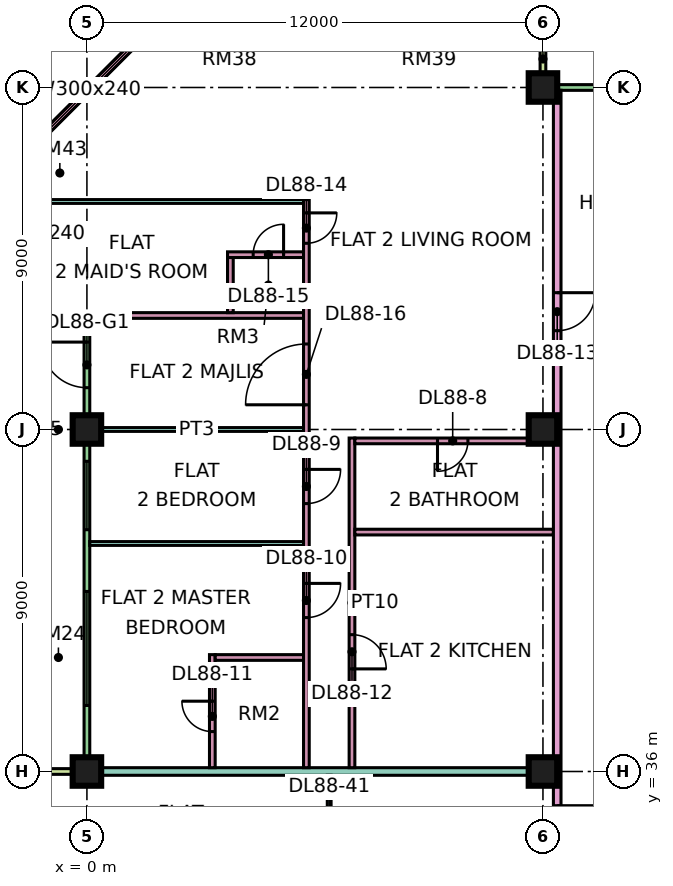
"""IFC4 building model, lengths in metres.
Left out: names, types, materials, properties, quantities, classifications, styles, units other than length and angle.
Written with IfcOpenShell. Run it as: python <this file> out.ifc"""

import sys

from ifc_helpers import new_model, si_unit, direction, frame, frame_2d, origin, origin_2d, place, context, subcontext, project, spatial, rectangle, extrude, element, fill, save


model = new_model("IFC4")
c1 = context("Model", 3, precision=1e-05, world=origin(), true_north=direction((0.0, 1.0)))
c2 = subcontext(c1, "Body", "Model", "MODEL_VIEW")
j1 = project(units=[si_unit("LENGTHUNIT", "METRE"), si_unit("PLANEANGLEUNIT", "RADIAN")], contexts=[c1])
p1 = place(None, origin())
s1 = spatial("IfcSite", under=j1, at=p1, CompositionType="ELEMENT")
p2 = place(p1, origin())
s2 = spatial("IfcBuilding", under=s1, at=p2, CompositionType="ELEMENT")
p3 = place(p2, frame((0.0, 0.0, 376.4)))
s3 = spatial("IfcBuildingStorey", under=s2, at=p3, CompositionType="ELEMENT", Elevation=376.4)
p4 = place(p3, frame((0.0, 36.0, 0.0), z_axis=(0.0, 0.0, 1.0), x_axis=(1.0, 0.0, 0.0)))
e1 = element("IfcColumn", 1, at=p4, inside=s3, PredefinedType="COLUMN", context=c2, shape_type="SweptSolid", body=[
    extrude(rectangle(XDim=0.75, YDim=0.75, at=origin_2d()), origin(), (0.0, 0.0, 1.0), 3.75),
])
for number, where, z_axis, x_axis in (
    (2, (0.0, 45.0, 0.0), (0.0, 0.0, 1.0), (1.0, 0.0, 0.0)),
    (3, (12.0, 36.0, 0.0), (0.0, 0.0, 1.0), (1.0, 0.0, 0.0)),
    (4, (12.0, 45.0, 0.0), (0.0, 0.0, 1.0), (1.0, 0.0, 0.0)),
    (5, (12.0, 54.0, 0.0), (0.0, 0.0, 1.0), (1.0, 0.0, 0.0)),
):
    element("IfcColumn", number, at=place(p3, frame(where, z_axis=z_axis, x_axis=x_axis)), inside=s3, PredefinedType="COLUMN", context=c2, shape_type="SweptSolid", body=[
        extrude(rectangle(XDim=0.75, YDim=0.75, at=origin_2d()), origin(), (0.0, 0.0, 1.0), 3.75),
    ])
p5 = place(p3, frame((22.425, 54.0, 0.0), z_axis=(0.0, 0.0, 1.0), x_axis=(-1.0, 0.0, 0.0)))
e6 = element("IfcWall", 6, at=p5, inside=s3, PredefinedType="SOLIDWALL", context=c2, shape_type="SweptSolid", body=[
    extrude(rectangle(XDim=10.35, YDim=0.15, at=frame_2d((5.175, 0.0))), origin(), (0.0, 0.0, 1.0), 3.35),
])
p6 = place(p5, frame((1.012, 0.0, 0.45)))
e7 = element("IfcOpeningElement", 7, at=p6, cuts=e6, PredefinedType="OPENING", context=c2, shape_type="SweptSolid", body=[
    extrude(rectangle(XDim=4.8, YDim=2.4, at=frame_2d((2.4, 1.2))), frame((0.0, 0.085, 0.0), z_axis=(0.0, -1.0, 0.0), x_axis=(1.0, 0.0, 0.0)), (0.0, 0.0, 1.0), 0.17),
])
p7 = place(p3, frame((12.0, 55.5, 0.0), z_axis=(0.0, 0.0, 1.0), x_axis=(0.0, -1.0, 0.0)))
e8 = element("IfcWall", 8, at=p7, inside=s3, PredefinedType="SOLIDWALL", context=c2, shape_type="SweptSolid", body=[
    extrude(rectangle(XDim=1.5, YDim=0.15, at=frame_2d((0.75, 0.0))), origin(), (0.0, 0.0, 1.0), 3.35),
])
p8 = place(p3, frame((1.553, 55.447, 0.0), z_axis=(0.0, 0.0, 1.0), x_axis=(-0.707106781187, -0.707106781187, 0.0)))
e9 = element("IfcWall", 9, at=p8, inside=s3, PredefinedType="SOLIDWALL", context=c2, shape_type="SweptSolid", body=[
    extrude(rectangle(XDim=4.243, YDim=0.15, at=frame_2d((2.121, 0.0))), origin(), (0.0, 0.0, 1.0), 3.35),
])
p9 = place(p8, frame((0.621, 0.0, 0.45)))
e10 = element("IfcOpeningElement", 10, at=p9, cuts=e9, PredefinedType="OPENING", context=c2, shape_type="SweptSolid", body=[
    extrude(rectangle(XDim=3.0, YDim=2.4, at=frame_2d((1.5, 1.2))), frame((0.0, 0.085, 0.0), z_axis=(0.0, -1.0, 0.0), x_axis=(1.0, 0.0, 0.0)), (0.0, 0.0, 1.0), 0.17),
])
p10 = place(p3, frame((0.0, 47.925, 0.0), z_axis=(0.0, 0.0, 1.0), x_axis=(0.0, -1.0, 0.0)))
e11 = element("IfcWall", 11, at=p10, inside=s3, PredefinedType="SOLIDWALL", context=c2, shape_type="SweptSolid", body=[
    extrude(rectangle(XDim=11.85, YDim=0.15, at=frame_2d((5.925, 0.0))), origin(), (0.0, 0.0, 1.0), 3.35),
])
p11 = place(p10, frame((0.625, 0.0, 0.0)))
e12 = element("IfcOpeningElement", 12, at=p11, cuts=e11, PredefinedType="OPENING", context=c2, shape_type="SweptSolid", body=[
    extrude(rectangle(XDim=1.2, YDim=2.4, at=frame_2d((0.6, 1.2))), frame((0.0, 0.085, 0.0), z_axis=(0.0, -1.0, 0.0), x_axis=(1.0, 0.0, 0.0)), (0.0, 0.0, 1.0), 0.17),
])
p12 = place(p10, frame((3.762, 0.0, 0.45)))
e13 = element("IfcOpeningElement", 13, at=p12, cuts=e11, PredefinedType="OPENING", context=c2, shape_type="SweptSolid", body=[
    extrude(rectangle(XDim=1.8, YDim=2.4, at=frame_2d((0.9, 1.2))), frame((0.0, 0.085, 0.0), z_axis=(0.0, -1.0, 0.0), x_axis=(1.0, 0.0, 0.0)), (0.0, 0.0, 1.0), 0.17),
])
p13 = place(p10, frame((7.188, 0.0, 0.45)))
e14 = element("IfcOpeningElement", 14, at=p13, cuts=e11, PredefinedType="OPENING", context=c2, shape_type="SweptSolid", body=[
    extrude(rectangle(XDim=3.0, YDim=2.4, at=frame_2d((1.5, 1.2))), frame((0.0, 0.085, 0.0), z_axis=(0.0, -1.0, 0.0), x_axis=(1.0, 0.0, 0.0)), (0.0, 0.0, 1.0), 0.17),
])
for number, where, z_axis, x_axis in (
    (15, (-1.5, 48.0, 0.0), (0.0, 0.0, 1.0), (1.0, 0.0, 0.0)),
    (16, (-1.5, 36.0, 0.0), (0.0, 0.0, 1.0), (1.0, 0.0, 0.0)),
):
    element("IfcWall", number, at=place(p3, frame(where, z_axis=z_axis, x_axis=x_axis)), inside=s3, PredefinedType="SOLIDWALL", context=c2, shape_type="SweptSolid", body=[
        extrude(rectangle(XDim=1.5, YDim=0.15, at=frame_2d((0.75, 0.0))), origin(), (0.0, 0.0, 1.0), 3.35),
    ])
e17 = element("IfcWall", 17, at=p4, inside=s3, PredefinedType="PARTITIONING", context=c2, shape_type="SweptSolid", body=[
    extrude(rectangle(XDim=12.275, YDim=0.2, at=frame_2d((6.137, 0.0))), origin(), (0.0, 0.0, 1.0), 3.35),
])
p14 = place(p3, frame((0.0, 48.0, 0.0), z_axis=(0.0, 0.0, 1.0), x_axis=(1.0, 0.0, 0.0)))
e18 = element("IfcWall", 18, at=p14, inside=s3, PredefinedType="PARTITIONING", context=c2, shape_type="SweptSolid", body=[
    extrude(rectangle(XDim=5.7, YDim=0.15, at=frame_2d((2.85, 0.0))), origin(), (0.0, 0.0, 1.0), 3.35),
])
p15 = place(p3, frame((-1.35, 51.0, 0.0), z_axis=(0.0, 0.0, 1.0), x_axis=(1.0, 0.0, 0.0)))
e19 = element("IfcWall", 19, at=p15, inside=s3, PredefinedType="PARTITIONING", context=c2, shape_type="SweptSolid", body=[
    extrude(rectangle(XDim=7.05, YDim=0.1, at=frame_2d((3.525, 0.0))), origin(), (0.0, 0.0, 1.0), 3.35),
])
for number, where, z_axis, x_axis in (
    (20, (0.074, 42.0, 0.0), (0.0, 0.0, 1.0), (1.0, 0.0, 0.0)),
    (21, (0.074, 45.0, 0.0), (0.0, 0.0, 1.0), (1.0, 0.0, 0.0)),
):
    element("IfcWall", number, at=place(p3, frame(where, z_axis=z_axis, x_axis=x_axis)), inside=s3, PredefinedType="PARTITIONING", context=c2, shape_type="SweptSolid", body=[
        extrude(rectangle(XDim=5.626, YDim=0.1, at=frame_2d((2.813, 0.0))), origin(), (0.0, 0.0, 1.0), 3.35),
    ])
p16 = place(p3, frame((3.3, 36.1, 0.0), z_axis=(0.0, 0.0, 1.0), x_axis=(0.0, 1.0, 0.0)))
e22 = element("IfcWall", 22, at=p16, inside=s3, PredefinedType="PARTITIONING", context=c2, shape_type="SweptSolid", body=[
    extrude(rectangle(XDim=2.975, YDim=0.15, at=frame_2d((1.487, 0.0))), origin(), (0.0, 0.0, 1.0), 3.35),
])
p17 = place(p16, frame((0.95, 0.0, 0.0)))
e23 = element("IfcOpeningElement", 23, at=p17, cuts=e22, PredefinedType="OPENING", context=c2, shape_type="SweptSolid", body=[
    extrude(rectangle(XDim=0.8, YDim=2.1, at=frame_2d((0.4, 1.05))), frame((0.0, 0.085, 0.0), z_axis=(0.0, -1.0, 0.0), x_axis=(1.0, 0.0, 0.0)), (0.0, 0.0, 1.0), 0.17),
])
p18 = place(p3, frame((3.375, 39.0, 0.0), z_axis=(0.0, 0.0, 1.0), x_axis=(1.0, 0.0, 0.0)))
e24 = element("IfcWall", 24, at=p18, inside=s3, PredefinedType="PARTITIONING", context=c2, shape_type="SweptSolid", body=[
    extrude(rectangle(XDim=2.325, YDim=0.15, at=frame_2d((1.163, 0.0))), origin(), (0.0, 0.0, 1.0), 3.35),
])
p19 = place(p3, frame((3.7, 49.6, 0.0), z_axis=(0.0, 0.0, 1.0), x_axis=(1.0, 0.0, 0.0)))
e25 = element("IfcWall", 25, at=p19, inside=s3, PredefinedType="PARTITIONING", context=c2, shape_type="SweptSolid", body=[
    extrude(rectangle(XDim=2.0, YDim=0.15, at=frame_2d((1.0, 0.0))), origin(), (0.0, 0.0, 1.0), 3.35),
])
p20 = place(p19, frame((0.675, 0.0, 0.0)))
e26 = element("IfcOpeningElement", 26, at=p20, cuts=e25, PredefinedType="OPENING", context=c2, shape_type="SweptSolid", body=[
    extrude(rectangle(XDim=0.8, YDim=2.1, at=frame_2d((0.4, 1.05))), frame((0.0, 0.085, 0.0), z_axis=(0.0, -1.0, 0.0), x_axis=(1.0, 0.0, 0.0)), (0.0, 0.0, 1.0), 0.17),
])
p21 = place(p3, frame((3.775, 48.075, 0.0), z_axis=(0.0, 0.0, 1.0), x_axis=(0.0, 1.0, 0.0)))
e27 = element("IfcWall", 27, at=p21, inside=s3, PredefinedType="PARTITIONING", context=c2, shape_type="SweptSolid", body=[
    extrude(rectangle(XDim=1.45, YDim=0.15, at=frame_2d((0.725, 0.0))), origin(), (0.0, 0.0, 1.0), 3.35),
])
p22 = place(p3, frame((5.775, 36.1, 0.0), z_axis=(0.0, 0.0, 1.0), x_axis=(0.0, 1.0, 0.0)))
e28 = element("IfcWall", 28, at=p22, inside=s3, PredefinedType="PARTITIONING", context=c2, shape_type="SweptSolid", body=[
    extrude(rectangle(XDim=14.95, YDim=0.15, at=frame_2d((7.475, 0.0))), origin(), (0.0, 0.0, 1.0), 3.35),
])
p23 = place(p22, frame((6.95, 0.0, 0.0)))
e29 = element("IfcOpeningElement", 29, at=p23, cuts=e28, PredefinedType="OPENING", context=c2, shape_type="SweptSolid", body=[
    extrude(rectangle(XDim=0.9, YDim=2.1, at=frame_2d((0.45, 1.05))), frame((0.0, 0.085, 0.0), z_axis=(0.0, -1.0, 0.0), x_axis=(1.0, 0.0, 0.0)), (0.0, 0.0, 1.0), 0.17),
])
p24 = place(p22, frame((3.95, 0.0, 0.0)))
e30 = element("IfcOpeningElement", 30, at=p24, cuts=e28, PredefinedType="OPENING", context=c2, shape_type="SweptSolid", body=[
    extrude(rectangle(XDim=0.9, YDim=2.1, at=frame_2d((0.45, 1.05))), frame((0.0, 0.085, 0.0), z_axis=(0.0, -1.0, 0.0), x_axis=(1.0, 0.0, 0.0)), (0.0, 0.0, 1.0), 0.17),
])
p25 = place(p22, frame((13.8, 0.0, 0.0)))
e31 = element("IfcOpeningElement", 31, at=p25, cuts=e28, PredefinedType="OPENING", context=c2, shape_type="SweptSolid", body=[
    extrude(rectangle(XDim=0.8, YDim=2.1, at=frame_2d((0.4, 1.05))), frame((0.0, 0.085, 0.0), z_axis=(0.0, -1.0, 0.0), x_axis=(1.0, 0.0, 0.0)), (0.0, 0.0, 1.0), 0.17),
])
p26 = place(p22, frame((9.55, 0.0, 0.0)))
e32 = element("IfcOpeningElement", 32, at=p26, cuts=e28, PredefinedType="OPENING", context=c2, shape_type="SweptSolid", body=[
    extrude(rectangle(XDim=1.6, YDim=2.1, at=frame_2d((0.8, 1.05))), frame((0.0, 0.085, 0.0), z_axis=(0.0, -1.0, 0.0), x_axis=(1.0, 0.0, 0.0)), (0.0, 0.0, 1.0), 0.17),
])
p27 = place(p3, frame((6.375, 33.05, 0.0), z_axis=(0.0, 0.0, 1.0), x_axis=(0.0, 1.0, 0.0)))
e33 = element("IfcWall", 33, at=p27, inside=s3, PredefinedType="PARTITIONING", context=c2, shape_type="SweptSolid", body=[
    extrude(rectangle(XDim=2.85, YDim=0.1, at=frame_2d((1.425, 0.0))), origin(), (0.0, 0.0, 1.0), 3.35),
])
p28 = place(p27, frame((1.0, 0.0, 0.0)))
e34 = element("IfcOpeningElement", 34, at=p28, cuts=e33, PredefinedType="OPENING", context=c2, shape_type="SweptSolid", body=[
    extrude(rectangle(XDim=0.9, YDim=2.1, at=frame_2d((0.45, 1.05))), frame((0.0, 0.06, 0.0), z_axis=(0.0, -1.0, 0.0), x_axis=(1.0, 0.0, 0.0)), (0.0, 0.0, 1.0), 0.12),
])
p29 = place(p3, frame((6.975, 36.1, 0.0), z_axis=(0.0, 0.0, 1.0), x_axis=(0.0, 1.0, 0.0)))
e35 = element("IfcWall", 35, at=p29, inside=s3, PredefinedType="PARTITIONING", context=c2, shape_type="SweptSolid", body=[
    extrude(rectangle(XDim=8.675, YDim=0.15, at=frame_2d((4.337, 0.0))), origin(), (0.0, 0.0, 1.0), 3.35),
])
p30 = place(p29, frame((2.6, 0.0, 0.0)))
e36 = element("IfcOpeningElement", 36, at=p30, cuts=e35, PredefinedType="OPENING", context=c2, shape_type="SweptSolid", body=[
    extrude(rectangle(XDim=0.9, YDim=2.1, at=frame_2d((0.45, 1.05))), frame((0.0, 0.085, 0.0), z_axis=(0.0, -1.0, 0.0), x_axis=(1.0, 0.0, 0.0)), (0.0, 0.0, 1.0), 0.17),
])
p31 = place(p3, frame((7.05, 42.3, 0.0), z_axis=(0.0, 0.0, 1.0), x_axis=(1.0, 0.0, 0.0)))
e37 = element("IfcWall", 37, at=p31, inside=s3, PredefinedType="PARTITIONING", context=c2, shape_type="SweptSolid", body=[
    extrude(rectangle(XDim=5.225, YDim=0.15, at=frame_2d((2.612, 0.0))), origin(), (0.0, 0.0, 1.0), 3.35),
])
p32 = place(p3, frame((7.05, 44.7, 0.0), z_axis=(0.0, 0.0, 1.0), x_axis=(1.0, 0.0, 0.0)))
e38 = element("IfcWall", 38, at=p32, inside=s3, PredefinedType="PARTITIONING", context=c2, shape_type="SweptSolid", body=[
    extrude(rectangle(XDim=5.225, YDim=0.15, at=frame_2d((2.612, 0.0))), origin(), (0.0, 0.0, 1.0), 3.35),
])
p33 = place(p32, frame((2.175, 0.0, 0.0)))
e39 = element("IfcOpeningElement", 39, at=p33, cuts=e38, PredefinedType="OPENING", context=c2, shape_type="SweptSolid", body=[
    extrude(rectangle(XDim=0.8, YDim=2.1, at=frame_2d((0.4, 1.05))), frame((0.0, 0.085, 0.0), z_axis=(0.0, -1.0, 0.0), x_axis=(1.0, 0.0, 0.0)), (0.0, 0.0, 1.0), 0.17),
])
p34 = place(p3, frame((12.375, 20.0, 0.0), z_axis=(0.0, 0.0, 1.0), x_axis=(0.0, 1.0, 0.0)))
e40 = element("IfcWall", 40, at=p34, inside=s3, PredefinedType="PARTITIONING", context=c2, shape_type="SweptSolid", body=[
    extrude(rectangle(XDim=33.926, YDim=0.2, at=frame_2d((16.963, 0.0))), origin(), (0.0, 0.0, 1.0), 3.35),
])
p35 = place(p34, frame((27.6, 0.0, 0.0)))
e41 = element("IfcOpeningElement", 41, at=p35, cuts=e40, PredefinedType="OPENING", context=c2, shape_type="SweptSolid", body=[
    extrude(rectangle(XDim=1.0, YDim=2.1, at=frame_2d((0.5, 1.05))), frame((0.0, 0.11, 0.0), z_axis=(0.0, -1.0, 0.0), x_axis=(1.0, 0.0, 0.0)), (0.0, 0.0, 1.0), 0.22),
])
p36 = place(p34, frame((0.6, 0.0, 0.0)))
e42 = element("IfcOpeningElement", 42, at=p36, cuts=e40, PredefinedType="OPENING", context=c2, shape_type="SweptSolid", body=[
    extrude(rectangle(XDim=1.2, YDim=2.1, at=frame_2d((0.6, 1.05))), frame((0.0, 0.11, 0.0), z_axis=(0.0, -1.0, 0.0), x_axis=(1.0, 0.0, 0.0)), (0.0, 0.0, 1.0), 0.22),
])
p37 = place(p34, frame((14.1, 0.0, 0.0)))
e43 = element("IfcOpeningElement", 43, at=p37, cuts=e40, PredefinedType="OPENING", context=c2, shape_type="SweptSolid", body=[
    extrude(rectangle(XDim=1.0, YDim=2.1, at=frame_2d((0.5, 1.05))), frame((0.0, 0.11, 0.0), z_axis=(0.0, -1.0, 0.0), x_axis=(1.0, 0.0, 0.0)), (0.0, 0.0, 1.0), 0.22),
])
p38 = place(p9, origin())
e44 = element("IfcWindow", 44, at=p38, inside=s3, PartitioningType="SINGLE_PANEL", PredefinedType="WINDOW", context=c2, shape_type="SweptSolid", body=[
    extrude(rectangle(XDim=3.0, YDim=2.4, at=frame_2d((1.5, 1.2))), frame((0.0, 0.03, 0.0), z_axis=(0.0, -1.0, 0.0), x_axis=(1.0, 0.0, 0.0)), (0.0, 0.0, 1.0), 0.06),
])
fill(e10, e44)
p39 = place(p11, frame((1.2, 0.0, 0.0), z_axis=(0.0, 0.0, 1.0), x_axis=(-1.0, 0.0, 0.0)))
e45 = element("IfcDoor", 45, at=p39, inside=s3, OperationType="DOUBLE_DOOR_SINGLE_SWING", PredefinedType="DOOR", context=c2, shape_type="SweptSolid", body=[
    extrude(rectangle(XDim=1.2, YDim=2.4, at=frame_2d((0.6, 1.2))), frame((0.0, 0.025, 0.0), z_axis=(0.0, -1.0, 0.0), x_axis=(1.0, 0.0, 0.0)), (0.0, 0.0, 1.0), 0.05),
])
fill(e12, e45)
p40 = place(p12, origin())
e46 = element("IfcWindow", 46, at=p40, inside=s3, PartitioningType="SINGLE_PANEL", PredefinedType="WINDOW", context=c2, shape_type="SweptSolid", body=[
    extrude(rectangle(XDim=1.8, YDim=2.4, at=frame_2d((0.9, 1.2))), frame((0.0, 0.03, 0.0), z_axis=(0.0, -1.0, 0.0), x_axis=(1.0, 0.0, 0.0)), (0.0, 0.0, 1.0), 0.06),
])
fill(e13, e46)
p41 = place(p13, origin())
e47 = element("IfcWindow", 47, at=p41, inside=s3, PartitioningType="SINGLE_PANEL", PredefinedType="WINDOW", context=c2, shape_type="SweptSolid", body=[
    extrude(rectangle(XDim=3.0, YDim=2.4, at=frame_2d((1.5, 1.2))), frame((0.0, 0.03, 0.0), z_axis=(0.0, -1.0, 0.0), x_axis=(1.0, 0.0, 0.0)), (0.0, 0.0, 1.0), 0.06),
])
fill(e14, e47)
p42 = place(p33, frame((0.8, 0.0, 0.0), z_axis=(0.0, 0.0, 1.0), x_axis=(-1.0, 0.0, 0.0)))
e48 = element("IfcDoor", 48, at=p42, inside=s3, OperationType="SINGLE_SWING_LEFT", PredefinedType="DOOR", context=c2, shape_type="SweptSolid", body=[
    extrude(rectangle(XDim=0.8, YDim=2.1, at=frame_2d((0.4, 1.05))), frame((0.0, 0.025, 0.0), z_axis=(0.0, -1.0, 0.0), x_axis=(1.0, 0.0, 0.0)), (0.0, 0.0, 1.0), 0.05),
])
fill(e39, e48)
p43 = place(p23, origin())
e49 = element("IfcDoor", 49, at=p43, inside=s3, OperationType="SINGLE_SWING_RIGHT", PredefinedType="DOOR", context=c2, shape_type="SweptSolid", body=[
    extrude(rectangle(XDim=0.9, YDim=2.1, at=frame_2d((0.45, 1.05))), frame((0.0, 0.025, 0.0), z_axis=(0.0, -1.0, 0.0), x_axis=(1.0, 0.0, 0.0)), (0.0, 0.0, 1.0), 0.05),
])
fill(e29, e49)
p44 = place(p24, origin())
e50 = element("IfcDoor", 50, at=p44, inside=s3, OperationType="SINGLE_SWING_RIGHT", PredefinedType="DOOR", context=c2, shape_type="SweptSolid", body=[
    extrude(rectangle(XDim=0.9, YDim=2.1, at=frame_2d((0.45, 1.05))), frame((0.0, 0.025, 0.0), z_axis=(0.0, -1.0, 0.0), x_axis=(1.0, 0.0, 0.0)), (0.0, 0.0, 1.0), 0.05),
])
fill(e30, e50)
p45 = place(p17, frame((0.8, 0.0, 0.0), z_axis=(0.0, 0.0, 1.0), x_axis=(-1.0, 0.0, 0.0)))
e51 = element("IfcDoor", 51, at=p45, inside=s3, OperationType="SINGLE_SWING_RIGHT", PredefinedType="DOOR", context=c2, shape_type="SweptSolid", body=[
    extrude(rectangle(XDim=0.8, YDim=2.1, at=frame_2d((0.4, 1.05))), frame((0.0, 0.025, 0.0), z_axis=(0.0, -1.0, 0.0), x_axis=(1.0, 0.0, 0.0)), (0.0, 0.0, 1.0), 0.05),
])
fill(e23, e51)
p46 = place(p30, frame((0.9, 0.0, 0.0), z_axis=(0.0, 0.0, 1.0), x_axis=(-1.0, 0.0, 0.0)))
e52 = element("IfcDoor", 52, at=p46, inside=s3, OperationType="SINGLE_SWING_LEFT", PredefinedType="DOOR", context=c2, shape_type="SweptSolid", body=[
    extrude(rectangle(XDim=0.9, YDim=2.1, at=frame_2d((0.45, 1.05))), frame((0.0, 0.025, 0.0), z_axis=(0.0, -1.0, 0.0), x_axis=(1.0, 0.0, 0.0)), (0.0, 0.0, 1.0), 0.05),
])
fill(e36, e52)
p47 = place(p35, origin())
e53 = element("IfcDoor", 53, at=p47, inside=s3, OperationType="SINGLE_SWING_RIGHT", PredefinedType="DOOR", context=c2, shape_type="SweptSolid", body=[
    extrude(rectangle(XDim=1.0, YDim=2.1, at=frame_2d((0.5, 1.05))), frame((0.0, 0.025, 0.0), z_axis=(0.0, -1.0, 0.0), x_axis=(1.0, 0.0, 0.0)), (0.0, 0.0, 1.0), 0.05),
])
fill(e41, e53)
p48 = place(p25, origin())
e54 = element("IfcDoor", 54, at=p48, inside=s3, OperationType="SINGLE_SWING_RIGHT", PredefinedType="DOOR", context=c2, shape_type="SweptSolid", body=[
    extrude(rectangle(XDim=0.8, YDim=2.1, at=frame_2d((0.4, 1.05))), frame((0.0, 0.025, 0.0), z_axis=(0.0, -1.0, 0.0), x_axis=(1.0, 0.0, 0.0)), (0.0, 0.0, 1.0), 0.05),
])
fill(e31, e54)
p49 = place(p20, frame((0.8, 0.0, 0.0), z_axis=(0.0, 0.0, 1.0), x_axis=(-1.0, 0.0, 0.0)))
e55 = element("IfcDoor", 55, at=p49, inside=s3, OperationType="SINGLE_SWING_RIGHT", PredefinedType="DOOR", context=c2, shape_type="SweptSolid", body=[
    extrude(rectangle(XDim=0.8, YDim=2.1, at=frame_2d((0.4, 1.05))), frame((0.0, 0.025, 0.0), z_axis=(0.0, -1.0, 0.0), x_axis=(1.0, 0.0, 0.0)), (0.0, 0.0, 1.0), 0.05),
])
fill(e26, e55)
p50 = place(p26, origin())
e56 = element("IfcDoor", 56, at=p50, inside=s3, OperationType="DOUBLE_DOOR_SINGLE_SWING", PredefinedType="DOOR", context=c2, shape_type="SweptSolid", body=[
    extrude(rectangle(XDim=1.6, YDim=2.1, at=frame_2d((0.8, 1.05))), frame((0.0, 0.025, 0.0), z_axis=(0.0, -1.0, 0.0), x_axis=(1.0, 0.0, 0.0)), (0.0, 0.0, 1.0), 0.05),
])
fill(e32, e56)
p51 = place(p37, origin())
e57 = element("IfcDoor", 57, at=p51, inside=s3, OperationType="SINGLE_SWING_RIGHT", PredefinedType="DOOR", context=c2, shape_type="SweptSolid", body=[
    extrude(rectangle(XDim=1.0, YDim=2.1, at=frame_2d((0.5, 1.05))), frame((0.0, 0.025, 0.0), z_axis=(0.0, -1.0, 0.0), x_axis=(1.0, 0.0, 0.0)), (0.0, 0.0, 1.0), 0.05),
])
fill(e43, e57)
save(model, sys.argv[1])
